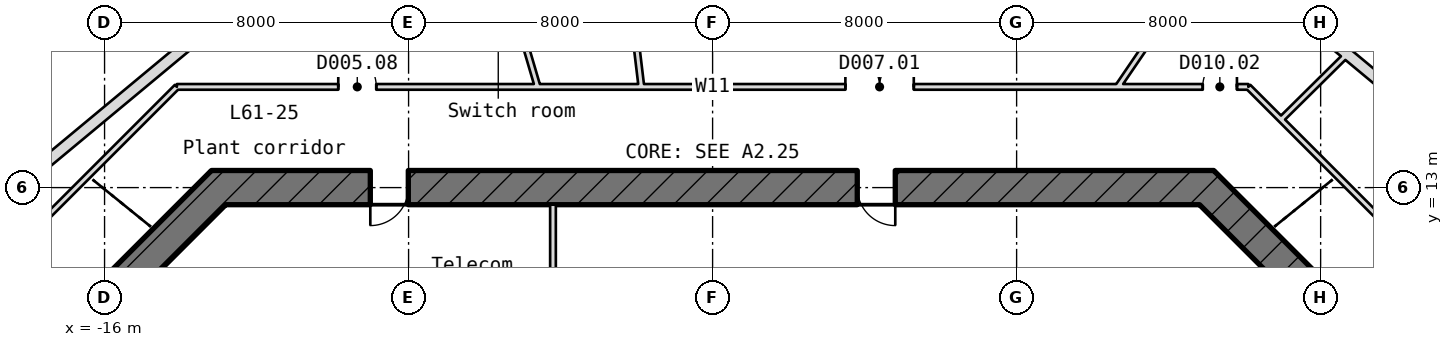
"""IFC4 building model, lengths in metres.
Left out: names, types, materials, properties, quantities, classifications, styles, units other than length and angle.
Written with IfcOpenShell. Run it as: python <this file> out.ifc"""

import sys

from ifc_helpers import new_model, si_unit, direction, frame, frame_2d, origin, place, context, subcontext, project, spatial, rectangle, extrude, element, fill, save


model = new_model("IFC4")
c1 = context("Model", 3, precision=1e-05, world=origin(), true_north=direction((0.0, 1.0)))
c2 = subcontext(c1, "Body", "Model", "MODEL_VIEW")
j1 = project(units=[si_unit("LENGTHUNIT", "METRE"), si_unit("PLANEANGLEUNIT", "RADIAN")], contexts=[c1])
p1 = place(None, origin())
s1 = spatial("IfcSite", under=j1, at=p1, CompositionType="ELEMENT")
p2 = place(p1, origin())
s2 = spatial("IfcBuilding", under=s1, at=p2, CompositionType="ELEMENT")
p3 = place(p2, frame((0.0, 0.0, 273.1)))
s3 = spatial("IfcBuildingStorey", under=s2, at=p3, CompositionType="ELEMENT", Elevation=273.1)
p4 = place(p3, frame((16.132, 9.868, -0.3), z_axis=(0.0, 0.0, 1.0), x_axis=(-0.707106781187, 0.707106781187, 0.0)))
e1 = element("IfcWall", 1, at=p4, inside=s3, PredefinedType="SHEAR", context=c2, shape_type="SweptSolid", body=[
    extrude(rectangle(XDim=4.615, YDim=0.9, at=frame_2d((2.308, 0.0))), origin(), (0.0, 0.0, 1.0), 6.05),
])
p5 = place(p3, frame((13.186, 13.0, -0.3), z_axis=(0.0, 0.0, 1.0), x_axis=(-1.0, 0.0, 0.0)))
e2 = element("IfcWall", 2, at=p5, inside=s3, PredefinedType="SHEAR", context=c2, shape_type="SweptSolid", body=[
    extrude(rectangle(XDim=26.373, YDim=0.9, at=frame_2d((13.186, 0.0))), origin(), (0.0, 0.0, 1.0), 6.05),
])
p6 = place(p5, frame((21.193, 0.0, 0.3)))
e3 = element("IfcOpeningElement", 3, at=p6, cuts=e2, PredefinedType="OPENING", context=c2, shape_type="SweptSolid", body=[
    extrude(rectangle(XDim=1.0, YDim=2.1, at=frame_2d((0.5, 1.05))), frame((0.0, 0.46, 0.0), z_axis=(0.0, -1.0, 0.0), x_axis=(1.0, 0.0, 0.0)), (0.0, 0.0, 1.0), 0.92),
])
p7 = place(p5, frame((8.379, 0.0, 0.3)))
e4 = element("IfcOpeningElement", 4, at=p7, cuts=e2, PredefinedType="OPENING", context=c2, shape_type="SweptSolid", body=[
    extrude(rectangle(XDim=1.0, YDim=2.1, at=frame_2d((0.5, 1.05))), frame((0.0, 0.46, 0.0), z_axis=(0.0, -1.0, 0.0), x_axis=(1.0, 0.0, 0.0)), (0.0, 0.0, 1.0), 0.92),
])
p8 = place(p3, frame((-12.868, 13.132, -0.3), z_axis=(0.0, 0.0, 1.0), x_axis=(-0.707106781187, -0.707106781187, 0.0)))
e5 = element("IfcWall", 5, at=p8, inside=s3, PredefinedType="SHEAR", context=c2, shape_type="SweptSolid", body=[
    extrude(rectangle(XDim=4.615, YDim=0.9, at=frame_2d((2.308, 0.0))), origin(), (0.0, 0.0, 1.0), 6.05),
])
p9 = place(p3, frame((-4.2, 8.46, 0.0), z_axis=(0.0, 0.0, 1.0), x_axis=(0.0, 1.0, 0.0)))
e6 = element("IfcWall", 6, at=p9, inside=s3, PredefinedType="PARTITIONING", context=c2, shape_type="SweptSolid", body=[
    extrude(rectangle(XDim=4.09, YDim=0.15, at=frame_2d((2.045, 0.0))), origin(), (0.0, 0.0, 1.0), 5.75),
])
p10 = place(p3, frame((-19.133, 12.337, 0.0), z_axis=(0.0, 0.0, 1.0), x_axis=(0.769069827142, 0.639164768257, 0.0)))
e7 = element("IfcWall", 7, at=p10, inside=s3, PredefinedType="STANDARD", context=c2, shape_type="SweptSolid", body=[
    extrude(rectangle(XDim=7.965, YDim=0.3, at=frame_2d((3.982, 0.0))), origin(), (0.0, 0.0, 1.0), 5.75),
])
p11 = place(p3, frame((21.265, 12.719, 0.0), z_axis=(0.0, 0.0, 1.0), x_axis=(-0.769009973498, 0.639236779809, 0.0)))
e8 = element("IfcWall", 8, at=p11, inside=s3, PredefinedType="STANDARD", context=c2, shape_type="SweptSolid", body=[
    extrude(rectangle(XDim=8.291, YDim=0.3, at=frame_2d((4.146, 0.0))), origin(), (0.0, 0.0, 1.0), 5.75),
])
p12 = place(p3, frame((-14.098, 15.65, 0.0), z_axis=(0.0, 0.0, 1.0), x_axis=(1.0, 0.0, 0.0)))
e9 = element("IfcWall", 9, at=p12, inside=s3, PredefinedType="PARTITIONING", context=c2, shape_type="SweptSolid", body=[
    extrude(rectangle(XDim=28.195, YDim=0.15, at=frame_2d((14.098, 0.0))), origin(), (0.0, 0.0, 1.0), 5.75),
])
p13 = place(p12, frame((26.995, 0.0, 0.0)))
e10 = element("IfcOpeningElement", 10, at=p13, cuts=e9, PredefinedType="OPENING", context=c2, shape_type="SweptSolid", body=[
    extrude(rectangle(XDim=0.9, YDim=2.1, at=frame_2d((0.45, 1.05))), frame((0.0, 0.085, 0.0), z_axis=(0.0, -1.0, 0.0), x_axis=(1.0, 0.0, 0.0)), (0.0, 0.0, 1.0), 0.17),
])
p14 = place(p12, frame((17.592, 0.0, 0.0)))
e11 = element("IfcOpeningElement", 11, at=p14, cuts=e9, PredefinedType="OPENING", context=c2, shape_type="SweptSolid", body=[
    extrude(rectangle(XDim=1.8, YDim=2.1, at=frame_2d((0.9, 1.05))), frame((0.0, 0.085, 0.0), z_axis=(0.0, -1.0, 0.0), x_axis=(1.0, 0.0, 0.0)), (0.0, 0.0, 1.0), 0.17),
])
p15 = place(p12, frame((4.248, 0.0, 0.0)))
e12 = element("IfcOpeningElement", 12, at=p15, cuts=e9, PredefinedType="OPENING", context=c2, shape_type="SweptSolid", body=[
    extrude(rectangle(XDim=1.0, YDim=2.1, at=frame_2d((0.5, 1.05))), frame((0.0, 0.085, 0.0), z_axis=(0.0, -1.0, 0.0), x_axis=(1.0, 0.0, 0.0)), (0.0, 0.0, 1.0), 0.17),
])
p16 = place(p3, frame((14.958, 14.79, 0.0), z_axis=(0.0, 0.0, 1.0), x_axis=(0.711079754695, 0.703111358508, 0.0)))
e13 = element("IfcWall", 13, at=p16, inside=s3, PredefinedType="PARTITIONING", context=c2, shape_type="SweptSolid", body=[
    extrude(rectangle(XDim=2.451, YDim=0.15, at=frame_2d((1.226, 0.0))), origin(), (0.0, 0.0, 1.0), 5.75),
])
p17 = place(p3, frame((-18.089, 11.658, 0.0), z_axis=(0.0, 0.0, 1.0), x_axis=(0.707106781187, 0.707106781187, 0.0)))
e14 = element("IfcWall", 14, at=p17, inside=s3, PredefinedType="PARTITIONING", context=c2, shape_type="SweptSolid", body=[
    extrude(rectangle(XDim=5.645, YDim=0.15, at=frame_2d((2.823, 0.0))), origin(), (0.0, 0.0, 1.0), 5.75),
])
p18 = place(p3, frame((10.661, 15.65, 0.0), z_axis=(0.0, 0.0, 1.0), x_axis=(0.563006246731, 0.826452639987, 0.0)))
e15 = element("IfcWall", 15, at=p18, inside=s3, PredefinedType="PARTITIONING", context=c2, shape_type="SweptSolid", body=[
    extrude(rectangle(XDim=3.759, YDim=0.15, at=frame_2d((1.879, 0.0))), origin(), (0.0, 0.0, 1.0), 5.75),
])
p19 = place(p3, frame((-1.873, 15.65, 0.0), z_axis=(0.0, 0.0, 1.0), x_axis=(-0.118861895323, 0.992910796517, 0.0)))
e16 = element("IfcWall", 16, at=p19, inside=s3, PredefinedType="PARTITIONING", context=c2, shape_type="SweptSolid", body=[
    extrude(rectangle(XDim=5.131, YDim=0.15, at=frame_2d((2.565, 0.0))), origin(), (0.0, 0.0, 1.0), 5.75),
])
p20 = place(p3, frame((-4.603, 15.65, 0.0), z_axis=(0.0, 0.0, 1.0), x_axis=(-0.282157374925, 0.959368133604, 0.0)))
e17 = element("IfcWall", 17, at=p20, inside=s3, PredefinedType="PARTITIONING", context=c2, shape_type="SweptSolid", body=[
    extrude(rectangle(XDim=4.431, YDim=0.15, at=frame_2d((2.215, 0.0))), origin(), (0.0, 0.0, 1.0), 5.75),
])
p21 = place(p20, frame((1.765, 0.0, 0.0)))
e18 = element("IfcOpeningElement", 18, at=p21, cuts=e17, PredefinedType="OPENING", context=c2, shape_type="SweptSolid", body=[
    extrude(rectangle(XDim=0.9, YDim=2.1, at=frame_2d((0.45, 1.05))), frame((0.0, 0.085, 0.0), z_axis=(0.0, -1.0, 0.0), x_axis=(1.0, 0.0, 0.0)), (0.0, 0.0, 1.0), 0.17),
])
p22 = place(p3, frame((18.65, 11.098, 0.0), z_axis=(0.0, 0.0, 1.0), x_axis=(-0.707106781187, 0.707106781187, 0.0)))
e19 = element("IfcWall", 19, at=p22, inside=s3, PredefinedType="PARTITIONING", context=c2, shape_type="SweptSolid", body=[
    extrude(rectangle(XDim=6.438, YDim=0.15, at=frame_2d((3.219, 0.0))), origin(), (0.0, 0.0, 1.0), 5.75),
])
p23 = place(p6, origin())
e20 = element("IfcDoor", 20, at=p23, inside=s3, OperationType="SINGLE_SWING_RIGHT", PredefinedType="DOOR", context=c2, shape_type="SweptSolid", body=[
    extrude(rectangle(XDim=1.0, YDim=2.1, at=frame_2d((0.5, 1.05))), frame((0.0, 0.025, 0.0), z_axis=(0.0, -1.0, 0.0), x_axis=(1.0, 0.0, 0.0)), (0.0, 0.0, 1.0), 0.05),
])
fill(e3, e20)
p24 = place(p7, origin())
e21 = element("IfcDoor", 21, at=p24, inside=s3, OperationType="SINGLE_SWING_RIGHT", PredefinedType="DOOR", context=c2, shape_type="SweptSolid", body=[
    extrude(rectangle(XDim=1.0, YDim=2.1, at=frame_2d((0.5, 1.05))), frame((0.0, 0.025, 0.0), z_axis=(0.0, -1.0, 0.0), x_axis=(1.0, 0.0, 0.0)), (0.0, 0.0, 1.0), 0.05),
])
fill(e4, e21)
p25 = place(p13, origin())
e22 = element("IfcDoor", 22, at=p25, inside=s3, OperationType="SINGLE_SWING_RIGHT", PredefinedType="DOOR", context=c2, shape_type="SweptSolid", body=[
    extrude(rectangle(XDim=0.9, YDim=2.1, at=frame_2d((0.45, 1.05))), frame((0.0, 0.025, 0.0), z_axis=(0.0, -1.0, 0.0), x_axis=(1.0, 0.0, 0.0)), (0.0, 0.0, 1.0), 0.05),
])
fill(e10, e22)
p26 = place(p14, origin())
e23 = element("IfcDoor", 23, at=p26, inside=s3, OperationType="DOUBLE_DOOR_SINGLE_SWING", PredefinedType="DOOR", context=c2, shape_type="SweptSolid", body=[
    extrude(rectangle(XDim=1.8, YDim=2.1, at=frame_2d((0.9, 1.05))), frame((0.0, 0.025, 0.0), z_axis=(0.0, -1.0, 0.0), x_axis=(1.0, 0.0, 0.0)), (0.0, 0.0, 1.0), 0.05),
])
fill(e11, e23)
p27 = place(p15, origin())
e24 = element("IfcDoor", 24, at=p27, inside=s3, OperationType="SINGLE_SWING_RIGHT", PredefinedType="DOOR", context=c2, shape_type="SweptSolid", body=[
    extrude(rectangle(XDim=1.0, YDim=2.1, at=frame_2d((0.5, 1.05))), frame((0.0, 0.025, 0.0), z_axis=(0.0, -1.0, 0.0), x_axis=(1.0, 0.0, 0.0)), (0.0, 0.0, 1.0), 0.05),
])
fill(e12, e24)
save(model, sys.argv[1])
